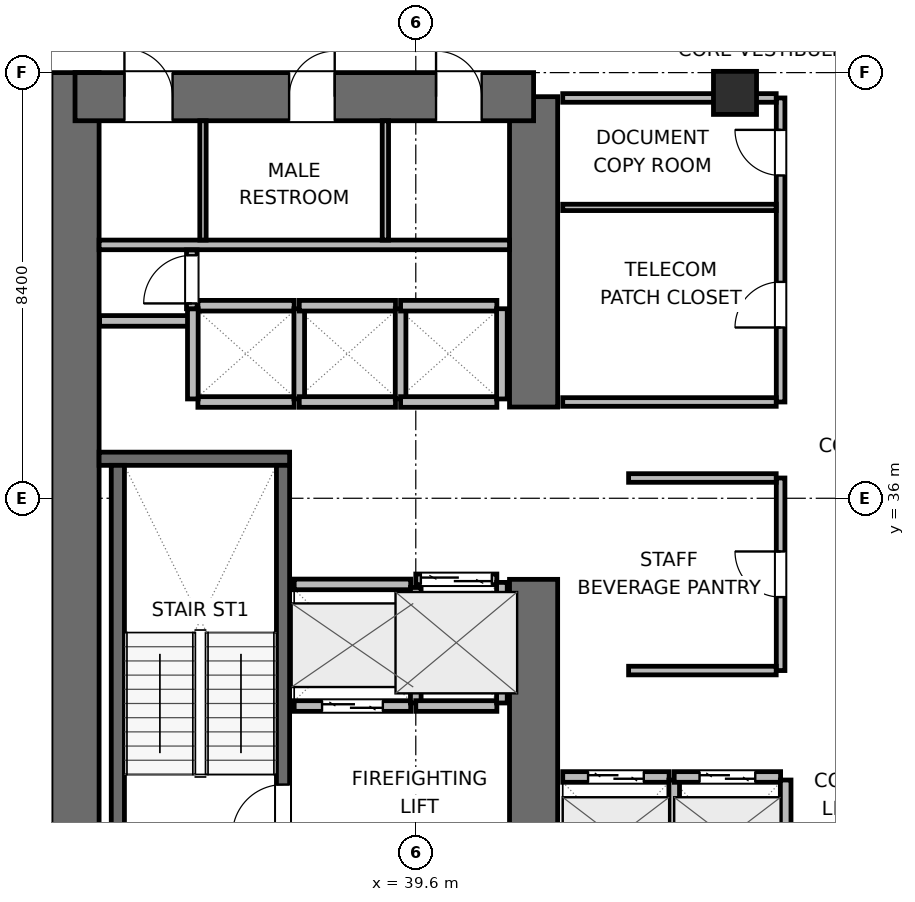
"""IFC4 building model, lengths in metres.
Left out: names, types, materials, properties, quantities, classifications, styles, units other than length and angle.
Written with IfcOpenShell. Run it as: python <this file> out.ifc"""

import sys

from ifc_helpers import new_model, si_unit, direction, frame, frame_2d, origin, origin_2d, place, context, subcontext, project, spatial, rectangle, extrude, element, fill, save


model = new_model("IFC4")
c1 = context("Model", 3, precision=1e-05, world=origin(), true_north=direction((0.0, 1.0)))
c2 = subcontext(c1, "Body", "Model", "MODEL_VIEW")
j1 = project(units=[si_unit("LENGTHUNIT", "METRE"), si_unit("PLANEANGLEUNIT", "RADIAN")], contexts=[c1])
p1 = place(None, origin())
s1 = spatial("IfcSite", under=j1, at=p1, CompositionType="ELEMENT")
p2 = place(p1, origin())
s2 = spatial("IfcBuilding", under=s1, at=p2, CompositionType="ELEMENT")
p3 = place(p2, frame((0.0, 0.0, 85.8)))
s3 = spatial("IfcBuildingStorey", under=s2, at=p3, CompositionType="ELEMENT", Elevation=85.8)
p4 = place(p3, frame((32.875, 27.6, 0.0), z_axis=(0.0, 0.0, 1.0), x_axis=(0.0, 1.0, 0.0)))
e1 = element("IfcWall", 1, at=p4, inside=s3, PredefinedType="SHEAR", context=c2, shape_type="SweptSolid", body=[
    extrude(rectangle(XDim=16.8, YDim=0.95, at=frame_2d((8.4, 0.0))), origin(), (0.0, 0.0, 1.0), 3.9),
])
p5 = place(p3, frame((41.925, 28.075, 0.0), z_axis=(0.0, 0.0, 1.0), x_axis=(0.0, 1.0, 0.0)))
e2 = element("IfcWall", 2, at=p5, inside=s3, PredefinedType="SHEAR", context=c2, shape_type="SweptSolid", body=[
    extrude(rectangle(XDim=6.325, YDim=0.95, at=frame_2d((3.163, 0.0))), origin(), (0.0, 0.0, 1.0), 3.9),
])
p6 = place(p3, frame((41.925, 37.8, 0.0), z_axis=(0.0, 0.0, 1.0), x_axis=(0.0, 1.0, 0.0)))
e3 = element("IfcWall", 3, at=p6, inside=s3, PredefinedType="SHEAR", context=c2, shape_type="SweptSolid", body=[
    extrude(rectangle(XDim=6.125, YDim=0.95, at=frame_2d((3.062, 0.0))), origin(), (0.0, 0.0, 1.0), 3.9),
])
p7 = place(p3, frame((32.875, 43.925, 0.0), z_axis=(0.0, 0.0, 1.0), x_axis=(1.0, 0.0, 0.0)))
e4 = element("IfcWall", 4, at=p7, inside=s3, PredefinedType="SHEAR", context=c2, shape_type="SweptSolid", body=[
    extrude(rectangle(XDim=9.05, YDim=0.95, at=frame_2d((4.525, 0.0))), origin(), (0.0, 0.0, 1.0), 3.9),
])
p8 = place(p7, frame((0.975, 0.0, 0.0)))
e5 = element("IfcOpeningElement", 5, at=p8, cuts=e4, PredefinedType="OPENING", context=c2, shape_type="SweptSolid", body=[
    extrude(rectangle(XDim=0.95, YDim=2.04, at=frame_2d((0.475, 1.02))), frame((0.0, 0.485, 0.0), z_axis=(0.0, -1.0, 0.0), x_axis=(1.0, 0.0, 0.0)), (0.0, 0.0, 1.0), 0.97),
])
p9 = place(p7, frame((4.225, 0.0, 0.0)))
e6 = element("IfcOpeningElement", 6, at=p9, cuts=e4, PredefinedType="OPENING", context=c2, shape_type="SweptSolid", body=[
    extrude(rectangle(XDim=0.9, YDim=2.02, at=frame_2d((0.45, 1.01))), frame((0.0, 0.485, 0.0), z_axis=(0.0, -1.0, 0.0), x_axis=(1.0, 0.0, 0.0)), (0.0, 0.0, 1.0), 0.97),
])
p10 = place(p7, frame((7.125, 0.0, 0.0)))
e7 = element("IfcOpeningElement", 7, at=p10, cuts=e4, PredefinedType="OPENING", context=c2, shape_type="SweptSolid", body=[
    extrude(rectangle(XDim=0.9, YDim=2.02, at=frame_2d((0.45, 1.01))), frame((0.0, 0.485, 0.0), z_axis=(0.0, -1.0, 0.0), x_axis=(1.0, 0.0, 0.0)), (0.0, 0.0, 1.0), 0.97),
])
p11 = place(p3, frame((33.35, 36.78, 0.0), z_axis=(0.0, 0.0, 1.0), x_axis=(1.0, 0.0, 0.0)))
e8 = element("IfcWall", 8, at=p11, inside=s3, PredefinedType="SHEAR", context=c2, shape_type="SweptSolid", body=[
    extrude(rectangle(XDim=3.76, YDim=0.26, at=frame_2d((1.88, 0.0))), origin(), (0.0, 0.0, 1.0), 3.9),
])
p12 = place(p3, frame((33.72, 29.05, 0.0), z_axis=(0.0, 0.0, 1.0), x_axis=(0.0, 1.0, 0.0)))
e9 = element("IfcWall", 9, at=p12, inside=s3, PredefinedType="SHEAR", context=c2, shape_type="SweptSolid", body=[
    extrude(rectangle(XDim=7.6, YDim=0.26, at=frame_2d((3.8, 0.0))), origin(), (0.0, 0.0, 1.0), 3.9),
])
p13 = place(p3, frame((36.98, 29.05, 0.0), z_axis=(0.0, 0.0, 1.0), x_axis=(0.0, 1.0, 0.0)))
e10 = element("IfcWall", 10, at=p13, inside=s3, PredefinedType="SHEAR", context=c2, shape_type="SweptSolid", body=[
    extrude(rectangle(XDim=7.6, YDim=0.26, at=frame_2d((3.8, 0.0))), origin(), (0.0, 0.0, 1.0), 3.9),
])
p14 = place(p13, frame((0.3, 0.0, 0.0)))
e11 = element("IfcOpeningElement", 11, at=p14, cuts=e10, PredefinedType="OPENING", context=c2, shape_type="SweptSolid", body=[
    extrude(rectangle(XDim=1.0, YDim=2.04, at=frame_2d((0.5, 1.02))), frame((0.0, 0.14, 0.0), z_axis=(0.0, -1.0, 0.0), x_axis=(1.0, 0.0, 0.0)), (0.0, 0.0, 1.0), 0.28),
])
p15 = place(p3, frame((45.9, 44.0, 0.0), z_axis=(0.0, 0.0, 1.0), x_axis=(1.0, 0.0, 0.0)))
e12 = element("IfcColumn", 12, at=p15, inside=s3, PredefinedType="COLUMN", context=c2, shape_type="SweptSolid", body=[
    extrude(rectangle(XDim=0.85, YDim=0.85, at=origin_2d()), origin(), (0.0, 0.0, 1.0), 3.9),
])
p16 = place(p3, frame((33.35, 41.0, 0.0), z_axis=(0.0, 0.0, 1.0), x_axis=(1.0, 0.0, 0.0)))
e13 = element("IfcWall", 13, at=p16, inside=s3, PredefinedType="PLUMBINGWALL", context=c2, shape_type="SweptSolid", body=[
    extrude(rectangle(XDim=8.1, YDim=0.19, at=frame_2d((4.05, 0.0))), origin(), (0.0, 0.0, 1.0), 3.64),
])
for number, where, z_axis, x_axis in (
    (14, (35.4, 41.095, 0.0), (0.0, 0.0, 1.0), (0.0, 1.0, 0.0)),
    (15, (39.0, 41.095, 0.0), (0.0, 0.0, 1.0), (0.0, 1.0, 0.0)),
):
    element("IfcWall", number, at=place(p3, frame(where, z_axis=z_axis, x_axis=x_axis)), inside=s3, PredefinedType="PARTITIONING", context=c2, shape_type="SweptSolid", body=[
        extrude(rectangle(XDim=2.355, YDim=0.125, at=frame_2d((1.177, 0.0))), origin(), (0.0, 0.0, 1.0), 3.64),
    ])
p17 = place(p3, frame((33.36, 39.5, 0.0), z_axis=(0.0, 0.0, 1.0), x_axis=(1.0, 0.0, 0.0)))
e16 = element("IfcWall", 16, at=p17, inside=s3, PredefinedType="PARTITIONING", context=c2, shape_type="SweptSolid", body=[
    extrude(rectangle(XDim=1.86, YDim=0.21, at=frame_2d((0.93, 0.0))), origin(), (0.0, 0.0, 1.0), 3.64),
])
p18 = place(p3, frame((37.2, 31.9, 0.0), z_axis=(0.0, 0.0, 1.0), x_axis=(1.0, 0.0, 0.0)))
e17 = element("IfcWall", 17, at=p18, inside=s3, PredefinedType="PARTITIONING", context=c2, shape_type="SweptSolid", body=[
    extrude(rectangle(XDim=2.3, YDim=0.21, at=frame_2d((1.15, 0.0))), origin(), (0.0, 0.0, 1.0), 3.64),
])
p19 = place(p18, frame((0.55, 0.0, 0.0)))
e18 = element("IfcOpeningElement", 18, at=p19, cuts=e17, PredefinedType="OPENING", context=c2, shape_type="SweptSolid", body=[
    extrude(rectangle(XDim=1.2, YDim=2.04, at=frame_2d((0.6, 1.02))), frame((0.0, 0.115, 0.0), z_axis=(0.0, -1.0, 0.0), x_axis=(1.0, 0.0, 0.0)), (0.0, 0.0, 1.0), 0.23),
])
p20 = place(p3, frame((37.2, 34.3, 0.0), z_axis=(0.0, 0.0, 1.0), x_axis=(1.0, 0.0, 0.0)))
e19 = element("IfcWall", 19, at=p20, inside=s3, PredefinedType="PARTITIONING", context=c2, shape_type="SweptSolid", body=[
    extrude(rectangle(XDim=2.3, YDim=0.21, at=frame_2d((1.15, 0.0))), origin(), (0.0, 0.0, 1.0), 3.64),
])
p21 = place(p3, frame((39.6, 31.96, 0.0), z_axis=(0.0, 0.0, 1.0), x_axis=(0.0, 1.0, 0.0)))
e20 = element("IfcWall", 20, at=p21, inside=s3, PredefinedType="PARTITIONING", context=c2, shape_type="SweptSolid", body=[
    extrude(rectangle(XDim=2.28, YDim=0.21, at=frame_2d((1.14, 0.0))), origin(), (0.0, 0.0, 1.0), 3.64),
])
p22 = place(p3, frame((39.6, 34.4, 0.0), z_axis=(0.0, 0.0, 1.0), x_axis=(1.0, 0.0, 0.0)))
e21 = element("IfcWall", 21, at=p22, inside=s3, PredefinedType="PARTITIONING", context=c2, shape_type="SweptSolid", body=[
    extrude(rectangle(XDim=1.6, YDim=0.21, at=frame_2d((0.8, 0.0))), origin(), (0.0, 0.0, 1.0), 3.64),
])
p23 = place(p22, frame((0.1, 0.0, 0.0)))
e22 = element("IfcOpeningElement", 22, at=p23, cuts=e21, PredefinedType="OPENING", context=c2, shape_type="SweptSolid", body=[
    extrude(rectangle(XDim=1.4, YDim=2.06, at=frame_2d((0.7, 1.03))), frame((0.0, 0.115, 0.0), z_axis=(0.0, -1.0, 0.0), x_axis=(1.0, 0.0, 0.0)), (0.0, 0.0, 1.0), 0.23),
])
p24 = place(p3, frame((39.6, 31.9, 0.0), z_axis=(0.0, 0.0, 1.0), x_axis=(1.0, 0.0, 0.0)))
e23 = element("IfcWall", 23, at=p24, inside=s3, PredefinedType="PARTITIONING", context=c2, shape_type="SweptSolid", body=[
    extrude(rectangle(XDim=1.6, YDim=0.21, at=frame_2d((0.8, 0.0))), origin(), (0.0, 0.0, 1.0), 3.64),
])
p25 = place(p3, frame((41.3, 31.96, 0.0), z_axis=(0.0, 0.0, 1.0), x_axis=(0.0, 1.0, 0.0)))
e24 = element("IfcWall", 24, at=p25, inside=s3, PredefinedType="PARTITIONING", context=c2, shape_type="SweptSolid", body=[
    extrude(rectangle(XDim=2.38, YDim=0.21, at=frame_2d((1.19, 0.0))), origin(), (0.0, 0.0, 1.0), 3.64),
])
p26 = place(p3, frame((42.5, 30.5, 0.0), z_axis=(0.0, 0.0, 1.0), x_axis=(1.0, 0.0, 0.0)))
e25 = element("IfcWall", 25, at=p26, inside=s3, PredefinedType="PARTITIONING", context=c2, shape_type="SweptSolid", body=[
    extrude(rectangle(XDim=2.1, YDim=0.21, at=frame_2d((1.05, 0.0))), origin(), (0.0, 0.0, 1.0), 3.64),
])
p27 = place(p26, frame((0.5, 0.0, 0.0)))
e26 = element("IfcOpeningElement", 26, at=p27, cuts=e25, PredefinedType="OPENING", context=c2, shape_type="SweptSolid", body=[
    extrude(rectangle(XDim=1.1, YDim=2.04, at=frame_2d((0.55, 1.02))), frame((0.0, 0.115, 0.0), z_axis=(0.0, -1.0, 0.0), x_axis=(1.0, 0.0, 0.0)), (0.0, 0.0, 1.0), 0.23),
])
p28 = place(p3, frame((44.7, 28.16, 0.0), z_axis=(0.0, 0.0, 1.0), x_axis=(0.0, 1.0, 0.0)))
e27 = element("IfcWall", 27, at=p28, inside=s3, PredefinedType="PARTITIONING", context=c2, shape_type="SweptSolid", body=[
    extrude(rectangle(XDim=2.28, YDim=0.21, at=frame_2d((1.14, 0.0))), origin(), (0.0, 0.0, 1.0), 3.64),
])
p29 = place(p3, frame((44.7, 30.5, 0.0), z_axis=(0.0, 0.0, 1.0), x_axis=(1.0, 0.0, 0.0)))
e28 = element("IfcWall", 28, at=p29, inside=s3, PredefinedType="PARTITIONING", context=c2, shape_type="SweptSolid", body=[
    extrude(rectangle(XDim=2.1, YDim=0.21, at=frame_2d((1.05, 0.0))), origin(), (0.0, 0.0, 1.0), 3.64),
])
p30 = place(p29, frame((0.5, 0.0, 0.0)))
e29 = element("IfcOpeningElement", 29, at=p30, cuts=e28, PredefinedType="OPENING", context=c2, shape_type="SweptSolid", body=[
    extrude(rectangle(XDim=1.1, YDim=2.04, at=frame_2d((0.55, 1.02))), frame((0.0, 0.115, 0.0), z_axis=(0.0, -1.0, 0.0), x_axis=(1.0, 0.0, 0.0)), (0.0, 0.0, 1.0), 0.23),
])
p31 = place(p3, frame((46.9, 28.16, 0.0), z_axis=(0.0, 0.0, 1.0), x_axis=(0.0, 1.0, 0.0)))
e30 = element("IfcWall", 30, at=p31, inside=s3, PredefinedType="PARTITIONING", context=c2, shape_type="SweptSolid", body=[
    extrude(rectangle(XDim=2.28, YDim=0.21, at=frame_2d((1.14, 0.0))), origin(), (0.0, 0.0, 1.0), 3.64),
])
for number, where, z_axis, x_axis in (
    (31, (35.3, 37.9, 0.0), (0.0, 0.0, 1.0), (1.0, 0.0, 0.0)),
    (32, (35.3, 39.8, 0.0), (0.0, 0.0, 1.0), (1.0, 0.0, 0.0)),
):
    element("IfcWall", number, at=place(p3, frame(where, z_axis=z_axis, x_axis=x_axis)), inside=s3, PredefinedType="PARTITIONING", context=c2, shape_type="SweptSolid", body=[
        extrude(rectangle(XDim=1.9, YDim=0.21, at=frame_2d((0.95, 0.0))), origin(), (0.0, 0.0, 1.0), 3.64),
    ])
for number, where, z_axis, x_axis in (
    (33, (35.2, 37.96, 0.0), (0.0, 0.0, 1.0), (0.0, 1.0, 0.0)),
    (34, (37.3, 37.96, 0.0), (0.0, 0.0, 1.0), (0.0, 1.0, 0.0)),
):
    element("IfcWall", number, at=place(p3, frame(where, z_axis=z_axis, x_axis=x_axis)), inside=s3, PredefinedType="PARTITIONING", context=c2, shape_type="SweptSolid", body=[
        extrude(rectangle(XDim=1.78, YDim=0.21, at=frame_2d((0.89, 0.0))), origin(), (0.0, 0.0, 1.0), 3.64),
    ])
for number, where, z_axis, x_axis in (
    (35, (37.3, 37.9, 0.0), (0.0, 0.0, 1.0), (1.0, 0.0, 0.0)),
    (36, (37.3, 39.8, 0.0), (0.0, 0.0, 1.0), (1.0, 0.0, 0.0)),
):
    element("IfcWall", number, at=place(p3, frame(where, z_axis=z_axis, x_axis=x_axis)), inside=s3, PredefinedType="PARTITIONING", context=c2, shape_type="SweptSolid", body=[
        extrude(rectangle(XDim=1.9, YDim=0.21, at=frame_2d((0.95, 0.0))), origin(), (0.0, 0.0, 1.0), 3.64),
    ])
p32 = place(p3, frame((39.3, 37.96, 0.0), z_axis=(0.0, 0.0, 1.0), x_axis=(0.0, 1.0, 0.0)))
e37 = element("IfcWall", 37, at=p32, inside=s3, PredefinedType="PARTITIONING", context=c2, shape_type="SweptSolid", body=[
    extrude(rectangle(XDim=1.78, YDim=0.21, at=frame_2d((0.89, 0.0))), origin(), (0.0, 0.0, 1.0), 3.64),
])
for number, where, z_axis, x_axis in (
    (38, (39.3, 37.9, 0.0), (0.0, 0.0, 1.0), (1.0, 0.0, 0.0)),
    (39, (39.3, 39.8, 0.0), (0.0, 0.0, 1.0), (1.0, 0.0, 0.0)),
):
    element("IfcWall", number, at=place(p3, frame(where, z_axis=z_axis, x_axis=x_axis)), inside=s3, PredefinedType="PARTITIONING", context=c2, shape_type="SweptSolid", body=[
        extrude(rectangle(XDim=1.9, YDim=0.21, at=frame_2d((0.95, 0.0))), origin(), (0.0, 0.0, 1.0), 3.64),
    ])
p33 = place(p3, frame((41.3, 37.96, 0.0), z_axis=(0.0, 0.0, 1.0), x_axis=(0.0, 1.0, 0.0)))
e40 = element("IfcWall", 40, at=p33, inside=s3, PredefinedType="PARTITIONING", context=c2, shape_type="SweptSolid", body=[
    extrude(rectangle(XDim=1.78, YDim=0.21, at=frame_2d((0.89, 0.0))), origin(), (0.0, 0.0, 1.0), 3.64),
])
p34 = place(p3, frame((35.18, 39.74, 0.0), z_axis=(0.0, 0.0, 1.0), x_axis=(0.0, 1.0, 0.0)))
e41 = element("IfcWall", 41, at=p34, inside=s3, PredefinedType="PARTITIONING", context=c2, shape_type="SweptSolid", body=[
    extrude(rectangle(XDim=1.16, YDim=0.21, at=frame_2d((0.58, 0.0))), origin(), (0.0, 0.0, 1.0), 3.64),
])
p35 = place(p34, frame((0.105, 0.0, 0.0)))
e42 = element("IfcOpeningElement", 42, at=p35, cuts=e41, PredefinedType="OPENING", context=c2, shape_type="SweptSolid", body=[
    extrude(rectangle(XDim=0.95, YDim=2.04, at=frame_2d((0.475, 1.02))), frame((0.0, 0.115, 0.0), z_axis=(0.0, -1.0, 0.0), x_axis=(1.0, 0.0, 0.0)), (0.0, 0.0, 1.0), 0.23),
])
p36 = place(p3, frame((46.8, 32.6, 0.0), z_axis=(0.0, 0.0, 1.0), x_axis=(0.0, 1.0, 0.0)))
e43 = element("IfcWall", 43, at=p36, inside=s3, PredefinedType="PARTITIONING", context=c2, shape_type="SweptSolid", body=[
    extrude(rectangle(XDim=3.8, YDim=0.17, at=frame_2d((1.9, 0.0))), origin(), (0.0, 0.0, 1.0), 3.64),
])
p37 = place(p36, frame((1.45, 0.0, 0.0)))
e44 = element("IfcOpeningElement", 44, at=p37, cuts=e43, PredefinedType="OPENING", context=c2, shape_type="SweptSolid", body=[
    extrude(rectangle(XDim=0.9, YDim=2.02, at=frame_2d((0.45, 1.01))), frame((0.0, 0.095, 0.0), z_axis=(0.0, -1.0, 0.0), x_axis=(1.0, 0.0, 0.0)), (0.0, 0.0, 1.0), 0.19),
])
for number, where, z_axis, x_axis in (
    (45, (43.8, 32.6, 0.0), (0.0, 0.0, 1.0), (1.0, 0.0, 0.0)),
    (46, (43.8, 36.4, 0.0), (0.0, 0.0, 1.0), (1.0, 0.0, 0.0)),
):
    element("IfcWall", number, at=place(p3, frame(where, z_axis=z_axis, x_axis=x_axis)), inside=s3, PredefinedType="PARTITIONING", context=c2, shape_type="SweptSolid", body=[
        extrude(rectangle(XDim=2.913, YDim=0.17, at=frame_2d((1.457, 0.0))), origin(), (0.0, 0.0, 1.0), 3.64),
    ])
p38 = place(p3, frame((46.8, 37.9, 0.0), z_axis=(0.0, 0.0, 1.0), x_axis=(0.0, 1.0, 0.0)))
e47 = element("IfcWall", 47, at=p38, inside=s3, PredefinedType="PARTITIONING", context=c2, shape_type="SweptSolid", body=[
    extrude(rectangle(XDim=6.0, YDim=0.17, at=frame_2d((3.0, 0.0))), origin(), (0.0, 0.0, 1.0), 3.64),
])
p39 = place(p38, frame((1.47, 0.0, 0.0)))
e48 = element("IfcOpeningElement", 48, at=p39, cuts=e47, PredefinedType="OPENING", context=c2, shape_type="SweptSolid", body=[
    extrude(rectangle(XDim=0.9, YDim=2.02, at=frame_2d((0.45, 1.01))), frame((0.0, 0.095, 0.0), z_axis=(0.0, -1.0, 0.0), x_axis=(1.0, 0.0, 0.0)), (0.0, 0.0, 1.0), 0.19),
])
p40 = place(p38, frame((4.47, 0.0, 0.0)))
e49 = element("IfcOpeningElement", 49, at=p40, cuts=e47, PredefinedType="OPENING", context=c2, shape_type="SweptSolid", body=[
    extrude(rectangle(XDim=0.9, YDim=2.02, at=frame_2d((0.45, 1.01))), frame((0.0, 0.095, 0.0), z_axis=(0.0, -1.0, 0.0), x_axis=(1.0, 0.0, 0.0)), (0.0, 0.0, 1.0), 0.19),
])
p41 = place(p3, frame((42.5, 37.9, 0.0), z_axis=(0.0, 0.0, 1.0), x_axis=(1.0, 0.0, 0.0)))
e50 = element("IfcWall", 50, at=p41, inside=s3, PredefinedType="PARTITIONING", context=c2, shape_type="SweptSolid", body=[
    extrude(rectangle(XDim=4.213, YDim=0.17, at=frame_2d((2.106, 0.0))), origin(), (0.0, 0.0, 1.0), 3.64),
])
p42 = place(p3, frame((42.5, 43.9, 0.0), z_axis=(0.0, 0.0, 1.0), x_axis=(1.0, 0.0, 0.0)))
e51 = element("IfcWall", 51, at=p42, inside=s3, PredefinedType="PARTITIONING", context=c2, shape_type="SweptSolid", body=[
    extrude(rectangle(XDim=4.213, YDim=0.17, at=frame_2d((2.106, 0.0))), origin(), (0.0, 0.0, 1.0), 2.525),
])
p43 = place(p3, frame((42.5, 41.74, 0.0), z_axis=(0.0, 0.0, 1.0), x_axis=(1.0, 0.0, 0.0)))
e52 = element("IfcWall", 52, at=p43, inside=s3, PredefinedType="PARTITIONING", context=c2, shape_type="SweptSolid", body=[
    extrude(rectangle(XDim=4.213, YDim=0.125, at=frame_2d((2.106, 0.0))), origin(), (0.0, 0.0, 1.0), 3.64),
])
p44 = place(p14, origin())
e53 = element("IfcDoor", 53, at=p44, inside=s3, OperationType="SINGLE_SWING_LEFT", PredefinedType="DOOR", context=c2, shape_type="SweptSolid", body=[
    extrude(rectangle(XDim=1.0, YDim=2.04, at=frame_2d((0.5, 1.02))), frame((0.0, 0.025, 0.0), z_axis=(0.0, -1.0, 0.0), x_axis=(1.0, 0.0, 0.0)), (0.0, 0.0, 1.0), 0.05),
])
fill(e11, e53)
p45 = place(p19, origin())
e54 = element("IfcDoor", 54, at=p45, inside=s3, OperationType="DOUBLE_DOOR_SLIDING", PredefinedType="DOOR", context=c2, shape_type="SweptSolid", body=[
    extrude(rectangle(XDim=1.2, YDim=2.04, at=frame_2d((0.6, 1.02))), frame((0.0, 0.025, 0.0), z_axis=(0.0, -1.0, 0.0), x_axis=(1.0, 0.0, 0.0)), (0.0, 0.0, 1.0), 0.05),
])
fill(e18, e54)
p46 = place(p23, origin())
e55 = element("IfcDoor", 55, at=p46, inside=s3, OperationType="DOUBLE_DOOR_SLIDING", PredefinedType="DOOR", context=c2, shape_type="SweptSolid", body=[
    extrude(rectangle(XDim=1.4, YDim=2.06, at=frame_2d((0.7, 1.03))), frame((0.0, 0.025, 0.0), z_axis=(0.0, -1.0, 0.0), x_axis=(1.0, 0.0, 0.0)), (0.0, 0.0, 1.0), 0.05),
])
fill(e22, e55)
p47 = place(p27, origin())
e56 = element("IfcDoor", 56, at=p47, inside=s3, OperationType="DOUBLE_DOOR_SLIDING", PredefinedType="DOOR", context=c2, shape_type="SweptSolid", body=[
    extrude(rectangle(XDim=1.1, YDim=2.04, at=frame_2d((0.55, 1.02))), frame((0.0, 0.025, 0.0), z_axis=(0.0, -1.0, 0.0), x_axis=(1.0, 0.0, 0.0)), (0.0, 0.0, 1.0), 0.05),
])
fill(e26, e56)
p48 = place(p30, origin())
e57 = element("IfcDoor", 57, at=p48, inside=s3, OperationType="DOUBLE_DOOR_SLIDING", PredefinedType="DOOR", context=c2, shape_type="SweptSolid", body=[
    extrude(rectangle(XDim=1.1, YDim=2.04, at=frame_2d((0.55, 1.02))), frame((0.0, 0.025, 0.0), z_axis=(0.0, -1.0, 0.0), x_axis=(1.0, 0.0, 0.0)), (0.0, 0.0, 1.0), 0.05),
])
fill(e29, e57)
p49 = place(p8, origin())
e58 = element("IfcDoor", 58, at=p49, inside=s3, OperationType="SINGLE_SWING_LEFT", PredefinedType="DOOR", context=c2, shape_type="SweptSolid", body=[
    extrude(rectangle(XDim=0.95, YDim=2.04, at=frame_2d((0.475, 1.02))), frame((0.0, 0.025, 0.0), z_axis=(0.0, -1.0, 0.0), x_axis=(1.0, 0.0, 0.0)), (0.0, 0.0, 1.0), 0.05),
])
fill(e5, e58)
p50 = place(p9, origin())
e59 = element("IfcDoor", 59, at=p50, inside=s3, OperationType="SINGLE_SWING_RIGHT", PredefinedType="DOOR", context=c2, shape_type="SweptSolid", body=[
    extrude(rectangle(XDim=0.9, YDim=2.02, at=frame_2d((0.45, 1.01))), frame((0.0, 0.025, 0.0), z_axis=(0.0, -1.0, 0.0), x_axis=(1.0, 0.0, 0.0)), (0.0, 0.0, 1.0), 0.05),
])
fill(e6, e59)
p51 = place(p10, origin())
e60 = element("IfcDoor", 60, at=p51, inside=s3, OperationType="SINGLE_SWING_LEFT", PredefinedType="DOOR", context=c2, shape_type="SweptSolid", body=[
    extrude(rectangle(XDim=0.9, YDim=2.02, at=frame_2d((0.45, 1.01))), frame((0.0, 0.025, 0.0), z_axis=(0.0, -1.0, 0.0), x_axis=(1.0, 0.0, 0.0)), (0.0, 0.0, 1.0), 0.05),
])
fill(e7, e60)
p52 = place(p35, origin())
e61 = element("IfcDoor", 61, at=p52, inside=s3, OperationType="SINGLE_SWING_LEFT", PredefinedType="DOOR", context=c2, shape_type="SweptSolid", body=[
    extrude(rectangle(XDim=0.95, YDim=2.04, at=frame_2d((0.475, 1.02))), frame((0.0, 0.025, 0.0), z_axis=(0.0, -1.0, 0.0), x_axis=(1.0, 0.0, 0.0)), (0.0, 0.0, 1.0), 0.05),
])
fill(e42, e61)
p53 = place(p37, origin())
e62 = element("IfcDoor", 62, at=p53, inside=s3, OperationType="SINGLE_SWING_RIGHT", PredefinedType="DOOR", context=c2, shape_type="SweptSolid", body=[
    extrude(rectangle(XDim=0.9, YDim=2.02, at=frame_2d((0.45, 1.01))), frame((0.0, 0.025, 0.0), z_axis=(0.0, -1.0, 0.0), x_axis=(1.0, 0.0, 0.0)), (0.0, 0.0, 1.0), 0.05),
])
fill(e44, e62)
p54 = place(p39, origin())
e63 = element("IfcDoor", 63, at=p54, inside=s3, OperationType="SINGLE_SWING_LEFT", PredefinedType="DOOR", context=c2, shape_type="SweptSolid", body=[
    extrude(rectangle(XDim=0.9, YDim=2.02, at=frame_2d((0.45, 1.01))), frame((0.0, 0.025, 0.0), z_axis=(0.0, -1.0, 0.0), x_axis=(1.0, 0.0, 0.0)), (0.0, 0.0, 1.0), 0.05),
])
fill(e48, e63)
p55 = place(p40, origin())
e64 = element("IfcDoor", 64, at=p55, inside=s3, OperationType="SINGLE_SWING_RIGHT", PredefinedType="DOOR", context=c2, shape_type="SweptSolid", body=[
    extrude(rectangle(XDim=0.9, YDim=2.02, at=frame_2d((0.45, 1.01))), frame((0.0, 0.025, 0.0), z_axis=(0.0, -1.0, 0.0), x_axis=(1.0, 0.0, 0.0)), (0.0, 0.0, 1.0), 0.05),
])
fill(e49, e64)
save(model, sys.argv[1])
